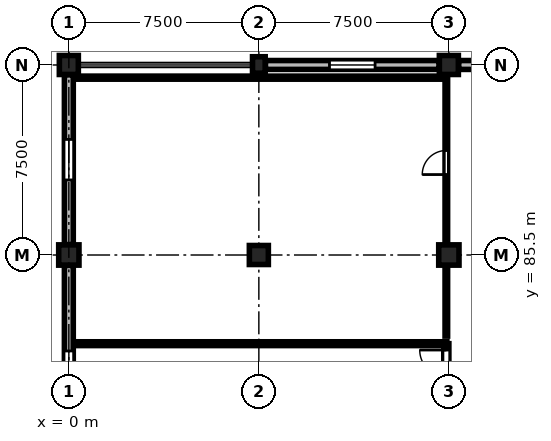
"""IFC4 building model, lengths in metres.
Left out: names, types, materials, properties, quantities, classifications, styles, units other than length and angle.
Written with IfcOpenShell. Run it as: python <this file> out.ifc"""

import sys

from ifc_helpers import new_model, si_unit, direction, frame, frame_2d, origin, origin_2d, place, context, subcontext, project, spatial, rectangle, circle, extrude, element, fill, save


model = new_model("IFC4")
c1 = context("Model", 3, precision=1e-05, world=origin(), true_north=direction((0.0, 1.0)))
c2 = subcontext(c1, "Body", "Model", "MODEL_VIEW")
j1 = project(units=[si_unit("LENGTHUNIT", "METRE"), si_unit("PLANEANGLEUNIT", "RADIAN")], contexts=[c1])
p1 = place(None, origin())
s1 = spatial("IfcSite", under=j1, at=p1, CompositionType="ELEMENT")
p2 = place(p1, origin())
s2 = spatial("IfcBuilding", under=s1, at=p2, CompositionType="ELEMENT")
p3 = place(p2, frame((0.0, 0.0, 4.8)))
s3 = spatial("IfcBuildingStorey", under=s2, at=p3, CompositionType="ELEMENT", Elevation=4.8)
p4 = place(p3, frame((0.0, 85.5, 0.0), z_axis=(0.0, 0.0, 1.0), x_axis=(1.0, 0.0, 0.0)))
e1 = element("IfcColumn", 1, at=p4, inside=s3, PredefinedType="COLUMN", context=c2, shape_type="SweptSolid", body=[
    extrude(rectangle(XDim=0.8, YDim=0.8, at=origin_2d()), origin(), (0.0, 0.0, 1.0), 4.5),
])
p5 = place(p3, frame((0.0, 93.0, 0.0), z_axis=(0.0, 0.0, 1.0), x_axis=(1.0, 0.0, 0.0)))
e2 = element("IfcColumn", 2, at=p5, inside=s3, PredefinedType="COLUMN", context=c2, shape_type="SweptSolid", body=[
    extrude(rectangle(XDim=0.75, YDim=0.75, at=origin_2d()), origin(), (0.0, 0.0, 1.0), 4.5),
])
p6 = place(p3, frame((7.5, 85.5, 0.0), z_axis=(0.0, 0.0, 1.0), x_axis=(1.0, 0.0, 0.0)))
e3 = element("IfcColumn", 3, at=p6, inside=s3, PredefinedType="COLUMN", context=c2, shape_type="SweptSolid", body=[
    extrude(circle(Radius=0.375, at=origin_2d()), origin(), (0.0, 0.0, 1.0), 4.5),
])
p7 = place(p3, frame((7.5, 93.0, 0.0), z_axis=(0.0, 0.0, 1.0), x_axis=(1.0, 0.0, 0.0)))
e4 = element("IfcColumn", 4, at=p7, inside=s3, PredefinedType="COLUMN", context=c2, shape_type="SweptSolid", body=[
    extrude(rectangle(XDim=0.5, YDim=0.65, at=origin_2d()), origin(), (0.0, 0.0, 1.0), 4.5),
])
p8 = place(p3, frame((15.0, 85.5, 0.0), z_axis=(0.0, 0.0, 1.0), x_axis=(1.0, 0.0, 0.0)))
e5 = element("IfcColumn", 5, at=p8, inside=s3, PredefinedType="COLUMN", context=c2, shape_type="SweptSolid", body=[
    extrude(rectangle(XDim=0.8, YDim=0.8, at=origin_2d()), origin(), (0.0, 0.0, 1.0), 4.5),
])
p9 = place(p3, frame((15.0, 93.0, 0.0), z_axis=(0.0, 0.0, 1.0), x_axis=(1.0, 0.0, 0.0)))
e6 = element("IfcColumn", 6, at=p9, inside=s3, PredefinedType="COLUMN", context=c2, shape_type="SweptSolid", body=[
    extrude(rectangle(XDim=0.75, YDim=0.75, at=origin_2d()), origin(), (0.0, 0.0, 1.0), 4.5),
])
p10 = place(p3, frame((0.0, 76.935, 0.0), z_axis=(0.0, 0.0, 1.0), x_axis=(0.0, 1.0, 0.0)))
e7 = element("IfcWall", 7, at=p10, inside=s3, PredefinedType="STANDARD", context=c2, shape_type="SweptSolid", body=[
    extrude(rectangle(XDim=8.155, YDim=0.35, at=frame_2d((4.078, 0.0))), origin(), (0.0, 0.0, 1.0), 3.63),
])
p11 = place(p10, frame((3.377, 0.0, 0.9)))
e8 = element("IfcOpeningElement", 8, at=p11, cuts=e7, PredefinedType="OPENING", context=c2, shape_type="SweptSolid", body=[
    extrude(rectangle(XDim=1.4, YDim=1.8, at=frame_2d((0.7, 0.9))), frame((0.0, 0.185, 0.0), z_axis=(0.0, -1.0, 0.0), x_axis=(1.0, 0.0, 0.0)), (0.0, 0.0, 1.0), 0.37),
])
p12 = place(p3, frame((0.0, 85.91, 0.0), z_axis=(0.0, 0.0, 1.0), x_axis=(0.0, 1.0, 0.0)))
e9 = element("IfcWall", 9, at=p12, inside=s3, PredefinedType="STANDARD", context=c2, shape_type="SweptSolid", body=[
    extrude(rectangle(XDim=6.705, YDim=0.35, at=frame_2d((3.353, 0.0))), origin(), (0.0, 0.0, 1.0), 3.63),
])
p13 = place(p12, frame((2.552, 0.0, 0.9)))
e10 = element("IfcOpeningElement", 10, at=p13, cuts=e9, PredefinedType="OPENING", context=c2, shape_type="SweptSolid", body=[
    extrude(rectangle(XDim=1.6, YDim=1.8, at=frame_2d((0.8, 0.9))), frame((0.0, 0.185, 0.0), z_axis=(0.0, -1.0, 0.0), x_axis=(1.0, 0.0, 0.0)), (0.0, 0.0, 1.0), 0.37),
])
p14 = place(p3, frame((7.76, 93.0, 0.0), z_axis=(0.0, 0.0, 1.0), x_axis=(1.0, 0.0, 0.0)))
e11 = element("IfcWall", 11, at=p14, inside=s3, PredefinedType="STANDARD", context=c2, shape_type="SweptSolid", body=[
    extrude(rectangle(XDim=6.855, YDim=0.35, at=frame_2d((3.427, 0.0))), origin(), (0.0, 0.0, 1.0), 3.63),
])
p15 = place(p14, frame((2.528, 0.0, 0.9)))
e12 = element("IfcOpeningElement", 12, at=p15, cuts=e11, PredefinedType="OPENING", context=c2, shape_type="SweptSolid", body=[
    extrude(rectangle(XDim=1.8, YDim=2.4, at=frame_2d((0.9, 1.2))), frame((0.0, 0.185, 0.0), z_axis=(0.0, -1.0, 0.0), x_axis=(1.0, 0.0, 0.0)), (0.0, 0.0, 1.0), 0.37),
])
p16 = place(p3, frame((15.385, 93.0, 0.0), z_axis=(0.0, 0.0, 1.0), x_axis=(1.0, 0.0, 0.0)))
e13 = element("IfcWall", 13, at=p16, inside=s3, PredefinedType="STANDARD", context=c2, shape_type="SweptSolid", body=[
    extrude(rectangle(XDim=6.855, YDim=0.35, at=frame_2d((3.427, 0.0))), origin(), (0.0, 0.0, 1.0), 3.63),
])
p17 = place(p16, frame((2.677, 0.0, 0.9)))
e14 = element("IfcOpeningElement", 14, at=p17, cuts=e13, PredefinedType="OPENING", context=c2, shape_type="SweptSolid", body=[
    extrude(rectangle(XDim=1.5, YDim=2.4, at=frame_2d((0.75, 1.2))), frame((0.0, 0.185, 0.0), z_axis=(0.0, -1.0, 0.0), x_axis=(1.0, 0.0, 0.0)), (0.0, 0.0, 1.0), 0.37),
])
p18 = place(p3, frame((14.9, 61.8, 0.0), z_axis=(0.0, 0.0, 1.0), x_axis=(0.0, 1.0, 0.0)))
e15 = element("IfcWall", 15, at=p18, inside=s3, PredefinedType="STANDARD", context=c2, shape_type="SweptSolid", body=[
    extrude(rectangle(XDim=20.2, YDim=0.2, at=frame_2d((10.1, 0.0))), origin(), (0.0, 0.0, 1.0), 3.465),
])
p19 = place(p18, frame((18.9, 0.0, 0.0)))
e16 = element("IfcOpeningElement", 16, at=p19, cuts=e15, PredefinedType="OPENING", context=c2, shape_type="SweptSolid", body=[
    extrude(rectangle(XDim=1.05, YDim=2.2, at=frame_2d((0.525, 1.1))), frame((0.0, 0.11, 0.0), z_axis=(0.0, -1.0, 0.0), x_axis=(1.0, 0.0, 0.0)), (0.0, 0.0, 1.0), 0.22),
])
p20 = place(p3, frame((14.9, 82.3, 0.0), z_axis=(0.0, 0.0, 1.0), x_axis=(0.0, 1.0, 0.0)))
e17 = element("IfcWall", 17, at=p20, inside=s3, PredefinedType="PARTITIONING", context=c2, shape_type="SweptSolid", body=[
    extrude(rectangle(XDim=10.2, YDim=0.1, at=frame_2d((5.1, 0.0))), origin(), (0.0, 0.0, 1.0), 3.465),
])
p21 = place(p20, frame((6.375, 0.0, 0.0)))
e18 = element("IfcOpeningElement", 18, at=p21, cuts=e17, PredefinedType="OPENING", context=c2, shape_type="SweptSolid", body=[
    extrude(rectangle(XDim=0.95, YDim=2.15, at=frame_2d((0.475, 1.075))), frame((0.0, 0.06, 0.0), z_axis=(0.0, -1.0, 0.0), x_axis=(1.0, 0.0, 0.0)), (0.0, 0.0, 1.0), 0.12),
])
p22 = place(p3, frame((0.35, 82.0, 0.0), z_axis=(0.0, 0.0, 1.0), x_axis=(1.0, 0.0, 0.0)))
e19 = element("IfcWall", 19, at=p22, inside=s3, PredefinedType="PARTITIONING", context=c2, shape_type="SweptSolid", body=[
    extrude(rectangle(XDim=14.55, YDim=0.15, at=frame_2d((7.275, 0.0))), origin(), (0.0, 0.0, 1.0), 4.165),
])
p23 = place(p3, frame((0.35, 92.5, 0.0), z_axis=(0.0, 0.0, 1.0), x_axis=(1.0, 0.0, 0.0)))
e20 = element("IfcWall", 20, at=p23, inside=s3, PredefinedType="PARTITIONING", context=c2, shape_type="SweptSolid", body=[
    extrude(rectangle(XDim=14.55, YDim=0.12, at=frame_2d((7.275, 0.0))), origin(), (0.0, 0.0, 1.0), 4.165),
])
p24 = place(p11, origin())
e21 = element("IfcWindow", 21, at=p24, inside=s3, PartitioningType="SINGLE_PANEL", PredefinedType="WINDOW", context=c2, shape_type="SweptSolid", body=[
    extrude(rectangle(XDim=1.4, YDim=1.8, at=frame_2d((0.7, 0.9))), frame((0.0, 0.03, 0.0), z_axis=(0.0, -1.0, 0.0), x_axis=(1.0, 0.0, 0.0)), (0.0, 0.0, 1.0), 0.06),
])
fill(e8, e21)
p25 = place(p13, origin())
e22 = element("IfcWindow", 22, at=p25, inside=s3, PartitioningType="SINGLE_PANEL", PredefinedType="WINDOW", context=c2, shape_type="SweptSolid", body=[
    extrude(rectangle(XDim=1.6, YDim=1.8, at=frame_2d((0.8, 0.9))), frame((0.0, 0.03, 0.0), z_axis=(0.0, -1.0, 0.0), x_axis=(1.0, 0.0, 0.0)), (0.0, 0.0, 1.0), 0.06),
])
fill(e10, e22)
p26 = place(p15, origin())
e23 = element("IfcWindow", 23, at=p26, inside=s3, PartitioningType="SINGLE_PANEL", PredefinedType="WINDOW", context=c2, shape_type="SweptSolid", body=[
    extrude(rectangle(XDim=1.8, YDim=2.4, at=frame_2d((0.9, 1.2))), frame((0.0, 0.03, 0.0), z_axis=(0.0, -1.0, 0.0), x_axis=(1.0, 0.0, 0.0)), (0.0, 0.0, 1.0), 0.06),
])
fill(e12, e23)
p27 = place(p19, origin())
e24 = element("IfcDoor", 24, at=p27, inside=s3, OperationType="SINGLE_SWING_RIGHT", PredefinedType="DOOR", context=c2, shape_type="SweptSolid", body=[
    extrude(rectangle(XDim=1.05, YDim=2.2, at=frame_2d((0.525, 1.1))), frame((0.0, 0.025, 0.0), z_axis=(0.0, -1.0, 0.0), x_axis=(1.0, 0.0, 0.0)), (0.0, 0.0, 1.0), 0.05),
])
fill(e16, e24)
p28 = place(p21, origin())
e25 = element("IfcDoor", 25, at=p28, inside=s3, OperationType="SINGLE_SWING_LEFT", PredefinedType="DOOR", context=c2, shape_type="SweptSolid", body=[
    extrude(rectangle(XDim=0.95, YDim=2.15, at=frame_2d((0.475, 1.075))), frame((0.0, 0.025, 0.0), z_axis=(0.0, -1.0, 0.0), x_axis=(1.0, 0.0, 0.0)), (0.0, 0.0, 1.0), 0.05),
])
fill(e18, e25)
save(model, sys.argv[1])
